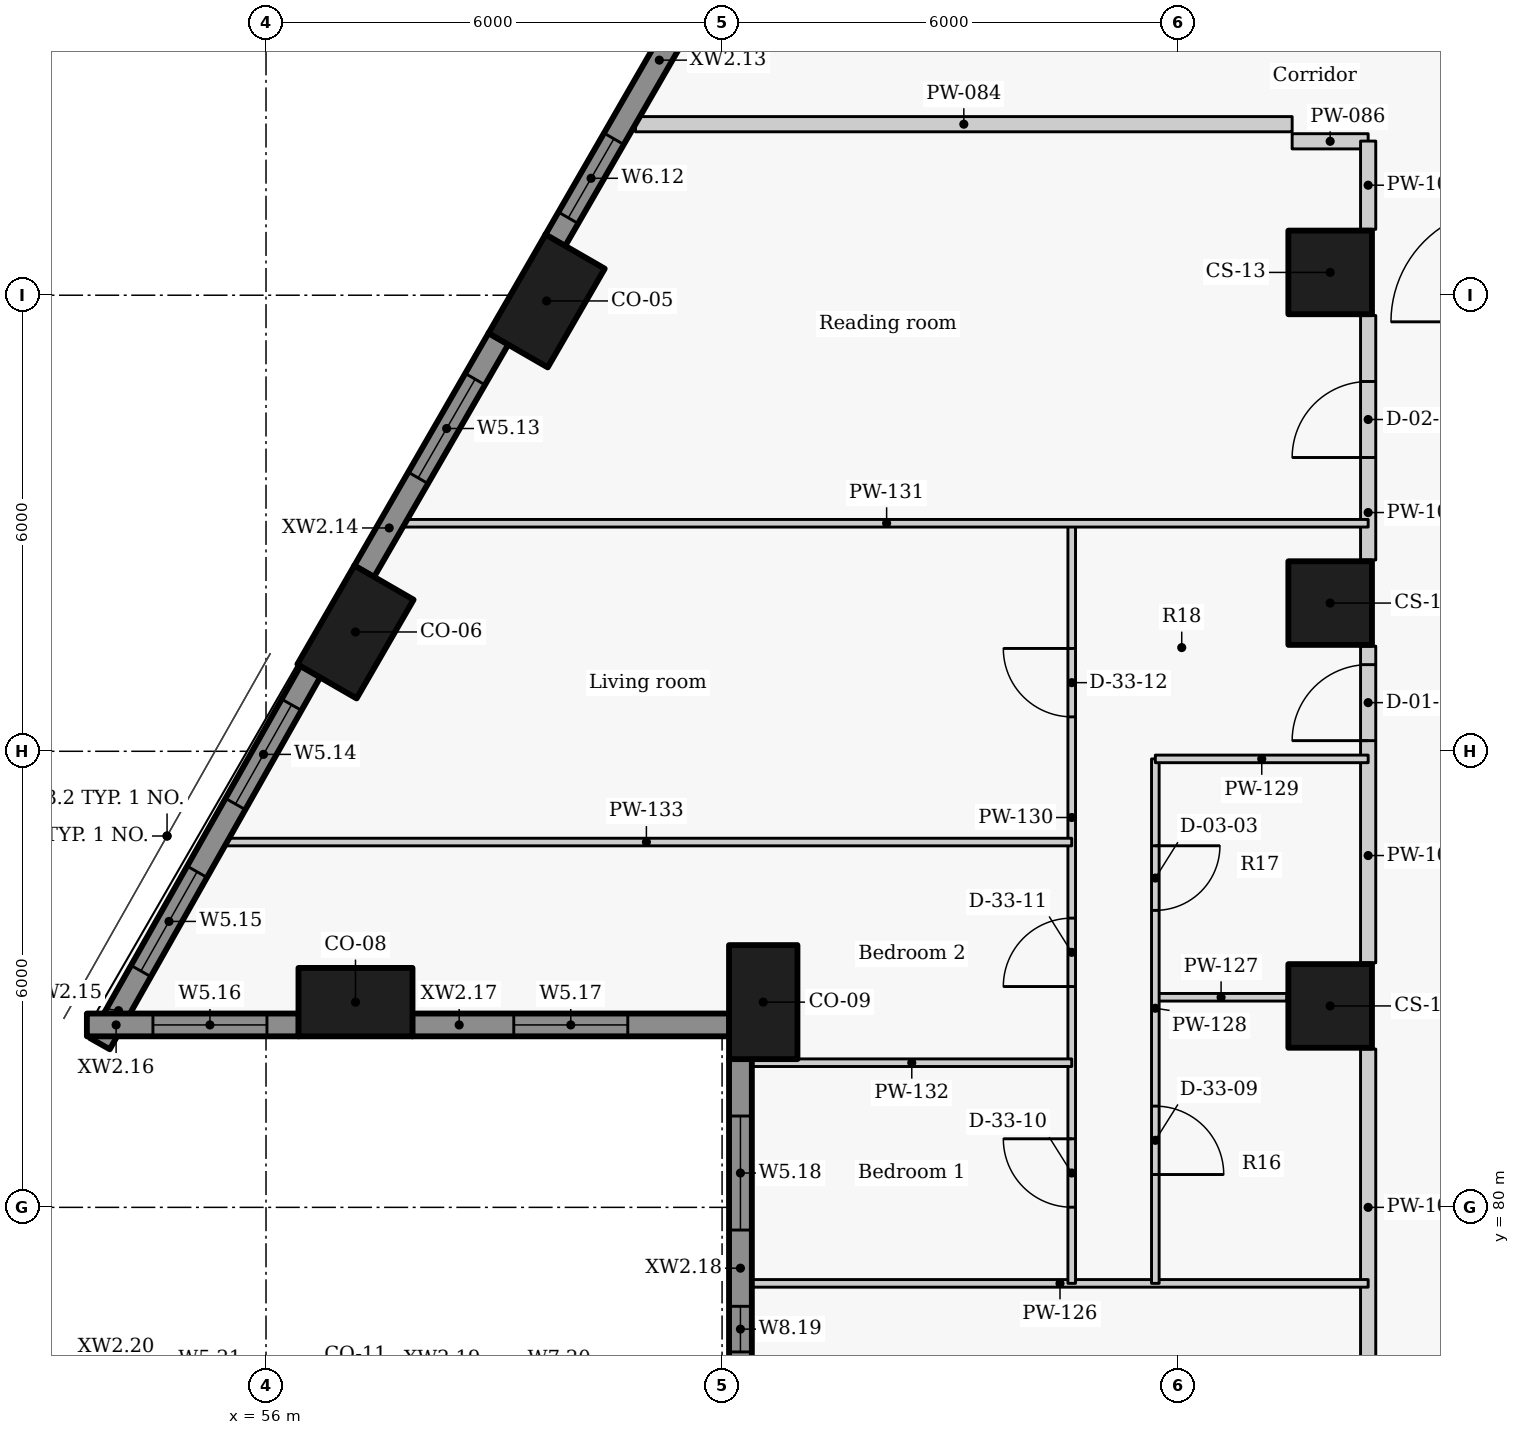
"""IFC4 building model, lengths in metres.
Left out: names, types, materials, properties, quantities, classifications, styles, units other than length and angle.
Written with IfcOpenShell. Run it as: python <this file> out.ifc"""

import sys

from ifc_helpers import new_model, si_unit, direction, frame, frame_2d, origin, origin_2d, place, context, subcontext, project, spatial, rectangle, extrude, element, fill, save


model = new_model("IFC4")
c1 = context("Model", 3, precision=1e-05, world=origin(), true_north=direction((0.0, 1.0)))
c2 = subcontext(c1, "Body", "Model", "MODEL_VIEW")
j1 = project(units=[si_unit("LENGTHUNIT", "METRE"), si_unit("PLANEANGLEUNIT", "RADIAN")], contexts=[c1])
p1 = place(None, origin())
s1 = spatial("IfcSite", under=j1, at=p1, CompositionType="ELEMENT")
p2 = place(p1, origin())
s2 = spatial("IfcBuilding", under=s1, at=p2, CompositionType="ELEMENT")
p3 = place(p2, frame((0.0, 0.0, 61.2)))
s3 = spatial("IfcBuildingStorey", under=s2, at=p3, CompositionType="ELEMENT", Elevation=61.2)
for number, where, z_axis, x_axis in (
    (1, (59.692, 91.925, 0.0), (0.0, 0.0, 1.0), (-0.5, -0.866, 0.0)),
    (2, (57.177, 87.57, 0.0), (0.0, 0.0, 1.0), (-0.5, -0.866, 0.0)),
    (3, (57.177, 82.7, 0.0), (0.0, 0.0, 1.0), (1.0, 0.0, 0.0)),
    (4, (62.542, 82.7, 0.0), (0.0, 0.0, 1.0), (0.0, -1.0, 0.0)),
):
    element("IfcColumn", number, at=place(p3, frame(where, z_axis=z_axis, x_axis=x_axis)), inside=s3, PredefinedType="COLUMN", context=c2, shape_type="SweptSolid", body=[
        extrude(rectangle(XDim=1.5, YDim=0.9, at=origin_2d()), origin(), (0.0, 0.0, 1.0), 3.3),
    ])
for number, where, z_axis, x_axis in (
    (5, (70.0, 92.3, 0.0), (0.0, 0.0, 1.0), (0.0, -1.0, 0.0)),
    (6, (70.0, 87.95, 0.0), (0.0, 0.0, 1.0), (0.0, -1.0, 0.0)),
    (7, (70.0, 82.65, 0.0), (0.0, 0.0, 1.0), (0.0, -1.0, 0.0)),
):
    element("IfcColumn", number, at=place(p3, frame(where, z_axis=z_axis, x_axis=x_axis)), inside=s3, PredefinedType="COLUMN", context=c2, shape_type="SweptSolid", body=[
        extrude(rectangle(XDim=1.1, YDim=1.1, at=origin_2d()), origin(), (0.0, 0.0, 1.0), 3.3),
    ])
p4 = place(p3, frame((61.722, 96.041, 0.0), z_axis=(0.0, 0.0, 1.0), x_axis=(-0.500001735503, -0.866024401789, 0.0)))
e8 = element("IfcWall", 8, at=p4, inside=s3, PredefinedType="SOLIDWALL", context=c2, shape_type="SweptSolid", body=[
    extrude(rectangle(XDim=3.834, YDim=0.3, at=frame_2d((1.917, 0.0))), origin(), (0.0, 0.0, 1.0), 2.425),
])
p5 = place(p4, frame((2.29, 0.0, 0.9)))
e9 = element("IfcOpeningElement", 9, at=p5, cuts=e8, PredefinedType="OPENING", context=c2, shape_type="SweptSolid", body=[
    extrude(rectangle(XDim=1.2, YDim=1.1, at=frame_2d((0.6, 0.55))), frame((0.0, 0.16, 0.0), z_axis=(0.0, -1.0, 0.0), x_axis=(1.0, 0.0, 0.0)), (0.0, 0.0, 1.0), 0.32),
])
p6 = place(p3, frame((59.059, 91.429, 0.0), z_axis=(0.0, 0.0, 1.0), x_axis=(-0.499977402622, -0.866038449993, 0.0)))
e10 = element("IfcWall", 10, at=p6, inside=s3, PredefinedType="SOLIDWALL", context=c2, shape_type="SweptSolid", body=[
    extrude(rectangle(XDim=3.537, YDim=0.3, at=frame_2d((1.769, 0.0))), origin(), (0.0, 0.0, 1.0), 2.425),
])
p7 = place(p6, frame((0.615, 0.0, 0.9)))
e11 = element("IfcOpeningElement", 11, at=p7, cuts=e10, PredefinedType="OPENING", context=c2, shape_type="SweptSolid", body=[
    extrude(rectangle(XDim=1.5, YDim=1.1, at=frame_2d((0.75, 0.55))), frame((0.0, 0.16, 0.0), z_axis=(0.0, -1.0, 0.0), x_axis=(1.0, 0.0, 0.0)), (0.0, 0.0, 1.0), 0.32),
])
p8 = place(p3, frame((56.584, 87.051, 0.0), z_axis=(0.0, 0.0, 1.0), x_axis=(-0.492363204642, -0.870389840655, 0.0)))
e12 = element("IfcWall", 12, at=p8, inside=s3, PredefinedType="SOLIDWALL", context=c2, shape_type="SweptSolid", body=[
    extrude(rectangle(XDim=5.626, YDim=0.3, at=frame_2d((2.813, 0.0))), origin(), (0.0, 0.0, 1.0), 2.425),
])
p9 = place(p8, frame((0.504, 0.0, 0.9)))
e13 = element("IfcOpeningElement", 13, at=p9, cuts=e12, PredefinedType="OPENING", context=c2, shape_type="SweptSolid", body=[
    extrude(rectangle(XDim=1.5, YDim=1.1, at=frame_2d((0.75, 0.55))), frame((0.0, 0.16, 0.0), z_axis=(0.0, -1.0, 0.0), x_axis=(1.0, 0.0, 0.0)), (0.0, 0.0, 1.0), 0.32),
])
p10 = place(p8, frame((3.028, 0.0, 0.9)))
e14 = element("IfcOpeningElement", 14, at=p10, cuts=e12, PredefinedType="OPENING", context=c2, shape_type="SweptSolid", body=[
    extrude(rectangle(XDim=1.5, YDim=1.1, at=frame_2d((0.75, 0.55))), frame((0.0, 0.16, 0.0), z_axis=(0.0, -1.0, 0.0), x_axis=(1.0, 0.0, 0.0)), (0.0, 0.0, 1.0), 0.32),
])
p11 = place(p3, frame((53.643, 82.4, 0.0), z_axis=(0.0, 0.0, 1.0), x_axis=(1.0, 0.0, 0.0)))
e15 = element("IfcWall", 15, at=p11, inside=s3, PredefinedType="SOLIDWALL", context=c2, shape_type="SweptSolid", body=[
    extrude(rectangle(XDim=2.788, YDim=0.3, at=frame_2d((1.394, 0.0))), origin(), (0.0, 0.0, 1.0), 2.425),
])
p12 = place(p11, frame((0.869, 0.0, 0.9)))
e16 = element("IfcOpeningElement", 16, at=p12, cuts=e15, PredefinedType="OPENING", context=c2, shape_type="SweptSolid", body=[
    extrude(rectangle(XDim=1.5, YDim=1.1, at=frame_2d((0.75, 0.55))), frame((0.0, 0.16, 0.0), z_axis=(0.0, -1.0, 0.0), x_axis=(1.0, 0.0, 0.0)), (0.0, 0.0, 1.0), 0.32),
])
p13 = place(p3, frame((57.923, 82.4, 0.0), z_axis=(0.0, 0.0, 1.0), x_axis=(1.0, 0.0, 0.0)))
e17 = element("IfcWall", 17, at=p13, inside=s3, PredefinedType="SOLIDWALL", context=c2, shape_type="SweptSolid", body=[
    extrude(rectangle(XDim=4.173, YDim=0.3, at=frame_2d((2.086, 0.0))), origin(), (0.0, 0.0, 1.0), 2.425),
])
p14 = place(p13, frame((1.336, 0.0, 0.9)))
e18 = element("IfcOpeningElement", 18, at=p14, cuts=e17, PredefinedType="OPENING", context=c2, shape_type="SweptSolid", body=[
    extrude(rectangle(XDim=1.5, YDim=1.1, at=frame_2d((0.75, 0.55))), frame((0.0, 0.16, 0.0), z_axis=(0.0, -1.0, 0.0), x_axis=(1.0, 0.0, 0.0)), (0.0, 0.0, 1.0), 0.32),
])
p15 = place(p3, frame((62.242, 81.954, 0.0), z_axis=(0.0, 0.0, 1.0), x_axis=(0.0, -1.0, 0.0)))
e19 = element("IfcWall", 19, at=p15, inside=s3, PredefinedType="SOLIDWALL", context=c2, shape_type="SweptSolid", body=[
    extrude(rectangle(XDim=4.208, YDim=0.3, at=frame_2d((2.104, 0.0))), origin(), (0.0, 0.0, 1.0), 2.425),
])
p16 = place(p15, frame((0.752, 0.0, 0.9)))
e20 = element("IfcOpeningElement", 20, at=p16, cuts=e19, PredefinedType="OPENING", context=c2, shape_type="SweptSolid", body=[
    extrude(rectangle(XDim=1.5, YDim=1.1, at=frame_2d((0.75, 0.55))), frame((0.0, 0.16, 0.0), z_axis=(0.0, -1.0, 0.0), x_axis=(1.0, 0.0, 0.0)), (0.0, 0.0, 1.0), 0.32),
])
p17 = place(p15, frame((3.256, 0.0, 0.9)))
e21 = element("IfcOpeningElement", 21, at=p17, cuts=e19, PredefinedType="OPENING", context=c2, shape_type="SweptSolid", body=[
    extrude(rectangle(XDim=0.6, YDim=1.1, at=frame_2d((0.3, 0.55))), frame((0.0, 0.16, 0.0), z_axis=(0.0, -1.0, 0.0), x_axis=(1.0, 0.0, 0.0)), (0.0, 0.0, 1.0), 0.32),
])
p18 = place(p3, frame((60.861, 94.25, 0.0), z_axis=(0.0, 0.0, 1.0), x_axis=(1.0, 0.0, 0.0)))
e22 = element("IfcWall", 22, at=p18, inside=s3, PredefinedType="PARTITIONING", context=c2, shape_type="SweptSolid", body=[
    extrude(rectangle(XDim=8.639, YDim=0.2, at=frame_2d((4.32, 0.0))), origin(), (0.0, 0.0, 1.0), 2.405),
])
p19 = place(p3, frame((69.5, 94.025, 0.0), z_axis=(0.0, 0.0, 1.0), x_axis=(1.0, 0.0, 0.0)))
e23 = element("IfcWall", 23, at=p19, inside=s3, PredefinedType="PARTITIONING", context=c2, shape_type="SweptSolid", body=[
    extrude(rectangle(XDim=1.0, YDim=0.2, at=frame_2d((0.5, 0.0))), origin(), (0.0, 0.0, 1.0), 2.505),
])
p20 = place(p3, frame((70.5, 77.917, 0.0), z_axis=(0.0, 0.0, 1.0), x_axis=(0.0, 1.0, 0.0)))
e24 = element("IfcWall", 24, at=p20, inside=s3, PredefinedType="PARTITIONING", context=c2, shape_type="SweptSolid", body=[
    extrude(rectangle(XDim=4.166, YDim=0.2, at=frame_2d((2.083, 0.0))), origin(), (0.0, 0.0, 1.0), 3.025),
])
p21 = place(p3, frame((70.5, 83.217, 0.0), z_axis=(0.0, 0.0, 1.0), x_axis=(0.0, 1.0, 0.0)))
e25 = element("IfcWall", 25, at=p21, inside=s3, PredefinedType="PARTITIONING", context=c2, shape_type="SweptSolid", body=[
    extrude(rectangle(XDim=4.166, YDim=0.2, at=frame_2d((2.083, 0.0))), origin(), (0.0, 0.0, 1.0), 3.025),
])
p22 = place(p21, frame((2.923, 0.0, 0.0)))
e26 = element("IfcOpeningElement", 26, at=p22, cuts=e25, PredefinedType="OPENING", context=c2, shape_type="SweptSolid", body=[
    extrude(rectangle(XDim=1.0, YDim=2.1, at=frame_2d((0.5, 1.05))), frame((0.0, 0.11, 0.0), z_axis=(0.0, -1.0, 0.0), x_axis=(1.0, 0.0, 0.0)), (0.0, 0.0, 1.0), 0.22),
])
p23 = place(p3, frame((70.5, 88.517, 0.0), z_axis=(0.0, 0.0, 1.0), x_axis=(0.0, 1.0, 0.0)))
e27 = element("IfcWall", 27, at=p23, inside=s3, PredefinedType="PARTITIONING", context=c2, shape_type="SweptSolid", body=[
    extrude(rectangle(XDim=3.216, YDim=0.2, at=frame_2d((1.608, 0.0))), origin(), (0.0, 0.0, 1.0), 3.025),
])
p24 = place(p23, frame((1.348, 0.0, 0.0)))
e28 = element("IfcOpeningElement", 28, at=p24, cuts=e27, PredefinedType="OPENING", context=c2, shape_type="SweptSolid", body=[
    extrude(rectangle(XDim=1.0, YDim=2.1, at=frame_2d((0.5, 1.05))), frame((0.0, 0.11, 0.0), z_axis=(0.0, -1.0, 0.0), x_axis=(1.0, 0.0, 0.0)), (0.0, 0.0, 1.0), 0.22),
])
p25 = place(p3, frame((70.5, 92.867, 0.0), z_axis=(0.0, 0.0, 1.0), x_axis=(0.0, 1.0, 0.0)))
e29 = element("IfcWall", 29, at=p25, inside=s3, PredefinedType="PARTITIONING", context=c2, shape_type="SweptSolid", body=[
    extrude(rectangle(XDim=1.161, YDim=0.2, at=frame_2d((0.581, 0.0))), origin(), (0.0, 0.0, 1.0), 3.025),
])
p26 = place(p3, frame((62.392, 79.0, 0.0), z_axis=(0.0, 0.0, 1.0), x_axis=(1.0, 0.0, 0.0)))
e30 = element("IfcWall", 30, at=p26, inside=s3, PredefinedType="PARTITIONING", context=c2, shape_type="SweptSolid", body=[
    extrude(rectangle(XDim=8.108, YDim=0.1, at=frame_2d((4.054, 0.0))), origin(), (0.0, 0.0, 1.0), 2.405),
])
p27 = place(p3, frame((67.7, 82.764, 0.0), z_axis=(0.0, 0.0, 1.0), x_axis=(1.0, 0.0, 0.0)))
e31 = element("IfcWall", 31, at=p27, inside=s3, PredefinedType="PARTITIONING", context=c2, shape_type="SweptSolid", body=[
    extrude(rectangle(XDim=1.73, YDim=0.1, at=frame_2d((0.865, 0.0))), origin(), (0.0, 0.0, 1.0), 3.025),
])
p28 = place(p3, frame((67.7, 85.9, 0.0), z_axis=(0.0, 0.0, 1.0), x_axis=(0.0, -1.0, 0.0)))
e32 = element("IfcWall", 32, at=p28, inside=s3, PredefinedType="PARTITIONING", context=c2, shape_type="SweptSolid", body=[
    extrude(rectangle(XDim=6.9, YDim=0.1, at=frame_2d((3.45, 0.0))), origin(), (0.0, 0.0, 1.0), 3.025),
])
p29 = place(p28, frame((4.568, 0.0, 0.0)))
e33 = element("IfcOpeningElement", 33, at=p29, cuts=e32, PredefinedType="OPENING", context=c2, shape_type="SweptSolid", body=[
    extrude(rectangle(XDim=0.9, YDim=2.1, at=frame_2d((0.45, 1.05))), frame((0.0, 0.06, 0.0), z_axis=(0.0, -1.0, 0.0), x_axis=(1.0, 0.0, 0.0)), (0.0, 0.0, 1.0), 0.12),
])
p30 = place(p28, frame((1.143, 0.0, 0.0)))
e34 = element("IfcOpeningElement", 34, at=p30, cuts=e32, PredefinedType="OPENING", context=c2, shape_type="SweptSolid", body=[
    extrude(rectangle(XDim=0.85, YDim=2.1, at=frame_2d((0.425, 1.05))), frame((0.0, 0.06, 0.0), z_axis=(0.0, -1.0, 0.0), x_axis=(1.0, 0.0, 0.0)), (0.0, 0.0, 1.0), 0.12),
])
p31 = place(p3, frame((67.7, 85.9, 0.0), z_axis=(0.0, 0.0, 1.0), x_axis=(1.0, 0.0, 0.0)))
e35 = element("IfcWall", 35, at=p31, inside=s3, PredefinedType="PARTITIONING", context=c2, shape_type="SweptSolid", body=[
    extrude(rectangle(XDim=2.8, YDim=0.1, at=frame_2d((1.4, 0.0))), origin(), (0.0, 0.0, 1.0), 2.505),
])
p32 = place(p3, frame((66.6, 79.0, 0.0), z_axis=(0.0, 0.0, 1.0), x_axis=(0.0, 1.0, 0.0)))
e36 = element("IfcWall", 36, at=p32, inside=s3, PredefinedType="PARTITIONING", context=c2, shape_type="SweptSolid", body=[
    extrude(rectangle(XDim=10.0, YDim=0.1, at=frame_2d((5.0, 0.0))), origin(), (0.0, 0.0, 1.0), 3.025),
])
p33 = place(p32, frame((1.002, 0.0, 0.0)))
e37 = element("IfcOpeningElement", 37, at=p33, cuts=e36, PredefinedType="OPENING", context=c2, shape_type="SweptSolid", body=[
    extrude(rectangle(XDim=0.9, YDim=2.1, at=frame_2d((0.45, 1.05))), frame((0.0, 0.06, 0.0), z_axis=(0.0, -1.0, 0.0), x_axis=(1.0, 0.0, 0.0)), (0.0, 0.0, 1.0), 0.12),
])
p34 = place(p32, frame((3.905, 0.0, 0.0)))
e38 = element("IfcOpeningElement", 38, at=p34, cuts=e36, PredefinedType="OPENING", context=c2, shape_type="SweptSolid", body=[
    extrude(rectangle(XDim=0.9, YDim=2.1, at=frame_2d((0.45, 1.05))), frame((0.0, 0.06, 0.0), z_axis=(0.0, -1.0, 0.0), x_axis=(1.0, 0.0, 0.0)), (0.0, 0.0, 1.0), 0.12),
])
p35 = place(p32, frame((7.453, 0.0, 0.0)))
e39 = element("IfcOpeningElement", 39, at=p35, cuts=e36, PredefinedType="OPENING", context=c2, shape_type="SweptSolid", body=[
    extrude(rectangle(XDim=0.9, YDim=2.1, at=frame_2d((0.45, 1.05))), frame((0.0, 0.06, 0.0), z_axis=(0.0, -1.0, 0.0), x_axis=(1.0, 0.0, 0.0)), (0.0, 0.0, 1.0), 0.12),
])
p36 = place(p3, frame((57.83, 89.0, 0.0), z_axis=(0.0, 0.0, 1.0), x_axis=(1.0, 0.0, 0.0)))
e40 = element("IfcWall", 40, at=p36, inside=s3, PredefinedType="PARTITIONING", context=c2, shape_type="SweptSolid", body=[
    extrude(rectangle(XDim=12.67, YDim=0.1, at=frame_2d((6.335, 0.0))), origin(), (0.0, 0.0, 1.0), 2.405),
])
p37 = place(p3, frame((62.392, 81.903, 0.0), z_axis=(0.0, 0.0, 1.0), x_axis=(1.0, 0.0, 0.0)))
e41 = element("IfcWall", 41, at=p37, inside=s3, PredefinedType="PARTITIONING", context=c2, shape_type="SweptSolid", body=[
    extrude(rectangle(XDim=4.208, YDim=0.1, at=frame_2d((2.104, 0.0))), origin(), (0.0, 0.0, 1.0), 2.405),
])
p38 = place(p3, frame((55.409, 84.806, 0.0), z_axis=(0.0, 0.0, 1.0), x_axis=(1.0, 0.0, 0.0)))
e42 = element("IfcWall", 42, at=p38, inside=s3, PredefinedType="PARTITIONING", context=c2, shape_type="SweptSolid", body=[
    extrude(rectangle(XDim=11.191, YDim=0.1, at=frame_2d((5.596, 0.0))), origin(), (0.0, 0.0, 1.0), 2.405),
])
p39 = place(p5, origin())
e43 = element("IfcWindow", 43, at=p39, inside=s3, PartitioningType="SINGLE_PANEL", PredefinedType="WINDOW", context=c2, shape_type="SweptSolid", body=[
    extrude(rectangle(XDim=1.2, YDim=1.1, at=frame_2d((0.6, 0.55))), frame((0.0, 0.03, 0.0), z_axis=(0.0, -1.0, 0.0), x_axis=(1.0, 0.0, 0.0)), (0.0, 0.0, 1.0), 0.06),
])
fill(e9, e43)
p40 = place(p7, origin())
e44 = element("IfcWindow", 44, at=p40, inside=s3, PartitioningType="SINGLE_PANEL", PredefinedType="WINDOW", context=c2, shape_type="SweptSolid", body=[
    extrude(rectangle(XDim=1.5, YDim=1.1, at=frame_2d((0.75, 0.55))), frame((0.0, 0.03, 0.0), z_axis=(0.0, -1.0, 0.0), x_axis=(1.0, 0.0, 0.0)), (0.0, 0.0, 1.0), 0.06),
])
fill(e11, e44)
p41 = place(p9, origin())
e45 = element("IfcWindow", 45, at=p41, inside=s3, PartitioningType="SINGLE_PANEL", PredefinedType="WINDOW", context=c2, shape_type="SweptSolid", body=[
    extrude(rectangle(XDim=1.5, YDim=1.1, at=frame_2d((0.75, 0.55))), frame((0.0, 0.03, 0.0), z_axis=(0.0, -1.0, 0.0), x_axis=(1.0, 0.0, 0.0)), (0.0, 0.0, 1.0), 0.06),
])
fill(e13, e45)
p42 = place(p10, origin())
e46 = element("IfcWindow", 46, at=p42, inside=s3, PartitioningType="SINGLE_PANEL", PredefinedType="WINDOW", context=c2, shape_type="SweptSolid", body=[
    extrude(rectangle(XDim=1.5, YDim=1.1, at=frame_2d((0.75, 0.55))), frame((0.0, 0.03, 0.0), z_axis=(0.0, -1.0, 0.0), x_axis=(1.0, 0.0, 0.0)), (0.0, 0.0, 1.0), 0.06),
])
fill(e14, e46)
p43 = place(p12, origin())
e47 = element("IfcWindow", 47, at=p43, inside=s3, PartitioningType="SINGLE_PANEL", PredefinedType="WINDOW", context=c2, shape_type="SweptSolid", body=[
    extrude(rectangle(XDim=1.5, YDim=1.1, at=frame_2d((0.75, 0.55))), frame((0.0, 0.03, 0.0), z_axis=(0.0, -1.0, 0.0), x_axis=(1.0, 0.0, 0.0)), (0.0, 0.0, 1.0), 0.06),
])
fill(e16, e47)
p44 = place(p14, origin())
e48 = element("IfcWindow", 48, at=p44, inside=s3, PartitioningType="SINGLE_PANEL", PredefinedType="WINDOW", context=c2, shape_type="SweptSolid", body=[
    extrude(rectangle(XDim=1.5, YDim=1.1, at=frame_2d((0.75, 0.55))), frame((0.0, 0.03, 0.0), z_axis=(0.0, -1.0, 0.0), x_axis=(1.0, 0.0, 0.0)), (0.0, 0.0, 1.0), 0.06),
])
fill(e18, e48)
p45 = place(p16, origin())
e49 = element("IfcWindow", 49, at=p45, inside=s3, PartitioningType="SINGLE_PANEL", PredefinedType="WINDOW", context=c2, shape_type="SweptSolid", body=[
    extrude(rectangle(XDim=1.5, YDim=1.1, at=frame_2d((0.75, 0.55))), frame((0.0, 0.03, 0.0), z_axis=(0.0, -1.0, 0.0), x_axis=(1.0, 0.0, 0.0)), (0.0, 0.0, 1.0), 0.06),
])
fill(e20, e49)
p46 = place(p17, origin())
e50 = element("IfcWindow", 50, at=p46, inside=s3, PartitioningType="SINGLE_PANEL", PredefinedType="WINDOW", context=c2, shape_type="SweptSolid", body=[
    extrude(rectangle(XDim=0.6, YDim=1.1, at=frame_2d((0.3, 0.55))), frame((0.0, 0.03, 0.0), z_axis=(0.0, -1.0, 0.0), x_axis=(1.0, 0.0, 0.0)), (0.0, 0.0, 1.0), 0.06),
])
fill(e21, e50)
p47 = place(p22, origin())
e51 = element("IfcDoor", 51, at=p47, inside=s3, OperationType="SINGLE_SWING_LEFT", PredefinedType="DOOR", context=c2, shape_type="SweptSolid", body=[
    extrude(rectangle(XDim=1.0, YDim=2.1, at=frame_2d((0.5, 1.05))), frame((0.0, 0.025, 0.0), z_axis=(0.0, -1.0, 0.0), x_axis=(1.0, 0.0, 0.0)), (0.0, 0.0, 1.0), 0.05),
])
fill(e26, e51)
p48 = place(p29, origin())
e52 = element("IfcDoor", 52, at=p48, inside=s3, OperationType="SINGLE_SWING_RIGHT", PredefinedType="DOOR", context=c2, shape_type="SweptSolid", body=[
    extrude(rectangle(XDim=0.9, YDim=2.1, at=frame_2d((0.45, 1.05))), frame((0.0, 0.025, 0.0), z_axis=(0.0, -1.0, 0.0), x_axis=(1.0, 0.0, 0.0)), (0.0, 0.0, 1.0), 0.05),
])
fill(e33, e52)
p49 = place(p30, origin())
e53 = element("IfcDoor", 53, at=p49, inside=s3, OperationType="SINGLE_SWING_LEFT", PredefinedType="DOOR", context=c2, shape_type="SweptSolid", body=[
    extrude(rectangle(XDim=0.85, YDim=2.1, at=frame_2d((0.425, 1.05))), frame((0.0, 0.025, 0.0), z_axis=(0.0, -1.0, 0.0), x_axis=(1.0, 0.0, 0.0)), (0.0, 0.0, 1.0), 0.05),
])
fill(e34, e53)
p50 = place(p33, origin())
e54 = element("IfcDoor", 54, at=p50, inside=s3, OperationType="SINGLE_SWING_RIGHT", PredefinedType="DOOR", context=c2, shape_type="SweptSolid", body=[
    extrude(rectangle(XDim=0.9, YDim=2.1, at=frame_2d((0.45, 1.05))), frame((0.0, 0.025, 0.0), z_axis=(0.0, -1.0, 0.0), x_axis=(1.0, 0.0, 0.0)), (0.0, 0.0, 1.0), 0.05),
])
fill(e37, e54)
p51 = place(p34, origin())
e55 = element("IfcDoor", 55, at=p51, inside=s3, OperationType="SINGLE_SWING_LEFT", PredefinedType="DOOR", context=c2, shape_type="SweptSolid", body=[
    extrude(rectangle(XDim=0.9, YDim=2.1, at=frame_2d((0.45, 1.05))), frame((0.0, 0.025, 0.0), z_axis=(0.0, -1.0, 0.0), x_axis=(1.0, 0.0, 0.0)), (0.0, 0.0, 1.0), 0.05),
])
fill(e38, e55)
p52 = place(p35, origin())
e56 = element("IfcDoor", 56, at=p52, inside=s3, OperationType="SINGLE_SWING_RIGHT", PredefinedType="DOOR", context=c2, shape_type="SweptSolid", body=[
    extrude(rectangle(XDim=0.9, YDim=2.1, at=frame_2d((0.45, 1.05))), frame((0.0, 0.025, 0.0), z_axis=(0.0, -1.0, 0.0), x_axis=(1.0, 0.0, 0.0)), (0.0, 0.0, 1.0), 0.05),
])
fill(e39, e56)
p53 = place(p24, origin())
e57 = element("IfcDoor", 57, at=p53, inside=s3, OperationType="SINGLE_SWING_LEFT", PredefinedType="DOOR", context=c2, shape_type="SweptSolid", body=[
    extrude(rectangle(XDim=1.0, YDim=2.1, at=frame_2d((0.5, 1.05))), frame((0.0, 0.025, 0.0), z_axis=(0.0, -1.0, 0.0), x_axis=(1.0, 0.0, 0.0)), (0.0, 0.0, 1.0), 0.05),
])
fill(e28, e57)
save(model, sys.argv[1])
